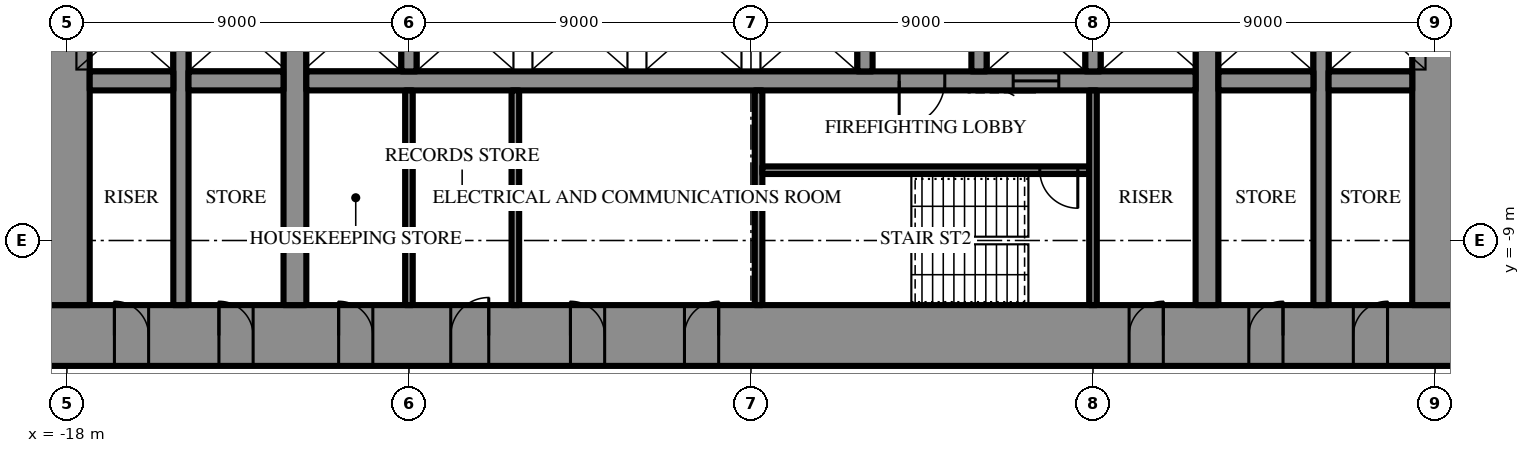
"""IFC4 building model, lengths in metres.
Left out: names, types, materials, properties, quantities, classifications, styles, units other than length and angle.
Written with IfcOpenShell. Run it as: python <this file> out.ifc"""

import sys

from ifc_helpers import new_model, si_unit, direction, frame, frame_2d, origin, place, context, subcontext, project, spatial, rectangle, extrude, element, fill, save


model = new_model("IFC4")
c1 = context("Model", 3, precision=1e-05, world=origin(), true_north=direction((0.0, 1.0)))
c2 = subcontext(c1, "Body", "Model", "MODEL_VIEW")
j1 = project(units=[si_unit("LENGTHUNIT", "METRE"), si_unit("PLANEANGLEUNIT", "RADIAN")], contexts=[c1])
p1 = place(None, origin())
s1 = spatial("IfcSite", under=j1, at=p1, CompositionType="ELEMENT")
p2 = place(p1, origin())
s2 = spatial("IfcBuilding", under=s1, at=p2, CompositionType="ELEMENT")
p3 = place(p2, frame((0.0, 0.0, 40.3)))
s3 = spatial("IfcBuildingStorey", under=s2, at=p3, CompositionType="ELEMENT", Elevation=40.3)
p4 = place(p3, frame((18.6, -11.5, 0.0), z_axis=(0.0, 0.0, 1.0), x_axis=(-1.0, 0.0, 0.0)))
e1 = element("IfcWall", 1, at=p4, inside=s3, PredefinedType="SHEAR", context=c2, shape_type="SweptSolid", body=[
    extrude(rectangle(XDim=37.2, YDim=1.6, at=frame_2d((18.6, 0.0))), origin(), (0.0, 0.0, 1.0), 4.2),
])
p5 = place(p4, frame((19.45, 0.0, 0.0)))
e2 = element("IfcOpeningElement", 2, at=p5, cuts=e1, PredefinedType="OPENING", context=c2, shape_type="SweptSolid", body=[
    extrude(rectangle(XDim=0.9, YDim=2.2, at=frame_2d((0.45, 1.1))), frame((0.0, 0.81, 0.0), z_axis=(0.0, -1.0, 0.0), x_axis=(1.0, 0.0, 0.0)), (0.0, 0.0, 1.0), 1.62),
])
p6 = place(p4, frame((22.45, 0.0, 0.0)))
e3 = element("IfcOpeningElement", 3, at=p6, cuts=e1, PredefinedType="OPENING", context=c2, shape_type="SweptSolid", body=[
    extrude(rectangle(XDim=0.9, YDim=2.2, at=frame_2d((0.45, 1.1))), frame((0.0, 0.81, 0.0), z_axis=(0.0, -1.0, 0.0), x_axis=(1.0, 0.0, 0.0)), (0.0, 0.0, 1.0), 1.62),
])
p7 = place(p4, frame((25.5, 0.0, 0.0)))
e4 = element("IfcOpeningElement", 4, at=p7, cuts=e1, PredefinedType="OPENING", context=c2, shape_type="SweptSolid", body=[
    extrude(rectangle(XDim=1.0, YDim=2.2, at=frame_2d((0.5, 1.1))), frame((0.0, 0.81, 0.0), z_axis=(0.0, -1.0, 0.0), x_axis=(1.0, 0.0, 0.0)), (0.0, 0.0, 1.0), 1.62),
])
p8 = place(p4, frame((1.85, 0.0, 0.0)))
e5 = element("IfcOpeningElement", 5, at=p8, cuts=e1, PredefinedType="OPENING", context=c2, shape_type="SweptSolid", body=[
    extrude(rectangle(XDim=0.9, YDim=2.2, at=frame_2d((0.45, 1.1))), frame((0.0, 0.81, 0.0), z_axis=(0.0, -1.0, 0.0), x_axis=(1.0, 0.0, 0.0)), (0.0, 0.0, 1.0), 1.62),
])
p9 = place(p4, frame((4.6, 0.0, 0.0)))
e6 = element("IfcOpeningElement", 6, at=p9, cuts=e1, PredefinedType="OPENING", context=c2, shape_type="SweptSolid", body=[
    extrude(rectangle(XDim=0.9, YDim=2.2, at=frame_2d((0.45, 1.1))), frame((0.0, 0.81, 0.0), z_axis=(0.0, -1.0, 0.0), x_axis=(1.0, 0.0, 0.0)), (0.0, 0.0, 1.0), 1.62),
])
p10 = place(p4, frame((7.75, 0.0, 0.0)))
e7 = element("IfcOpeningElement", 7, at=p10, cuts=e1, PredefinedType="OPENING", context=c2, shape_type="SweptSolid", body=[
    extrude(rectangle(XDim=0.9, YDim=2.2, at=frame_2d((0.45, 1.1))), frame((0.0, 0.81, 0.0), z_axis=(0.0, -1.0, 0.0), x_axis=(1.0, 0.0, 0.0)), (0.0, 0.0, 1.0), 1.62),
])
p11 = place(p4, frame((28.55, 0.0, 0.0)))
e8 = element("IfcOpeningElement", 8, at=p11, cuts=e1, PredefinedType="OPENING", context=c2, shape_type="SweptSolid", body=[
    extrude(rectangle(XDim=0.9, YDim=2.2, at=frame_2d((0.45, 1.1))), frame((0.0, 0.81, 0.0), z_axis=(0.0, -1.0, 0.0), x_axis=(1.0, 0.0, 0.0)), (0.0, 0.0, 1.0), 1.62),
])
p12 = place(p4, frame((31.7, 0.0, 0.0)))
e9 = element("IfcOpeningElement", 9, at=p12, cuts=e1, PredefinedType="OPENING", context=c2, shape_type="SweptSolid", body=[
    extrude(rectangle(XDim=0.9, YDim=2.2, at=frame_2d((0.45, 1.1))), frame((0.0, 0.81, 0.0), z_axis=(0.0, -1.0, 0.0), x_axis=(1.0, 0.0, 0.0)), (0.0, 0.0, 1.0), 1.62),
])
p13 = place(p4, frame((34.45, 0.0, 0.0)))
e10 = element("IfcOpeningElement", 10, at=p13, cuts=e1, PredefinedType="OPENING", context=c2, shape_type="SweptSolid", body=[
    extrude(rectangle(XDim=0.9, YDim=2.2, at=frame_2d((0.45, 1.1))), frame((0.0, 0.81, 0.0), z_axis=(0.0, -1.0, 0.0), x_axis=(1.0, 0.0, 0.0)), (0.0, 0.0, 1.0), 1.62),
])
p14 = place(p3, frame((18.0, -10.7, 0.0), z_axis=(0.0, 0.0, 1.0), x_axis=(0.0, 1.0, 0.0)))
e11 = element("IfcWall", 11, at=p14, inside=s3, PredefinedType="SHEAR", context=c2, shape_type="SweptSolid", body=[
    extrude(rectangle(XDim=21.4, YDim=1.2, at=frame_2d((10.7, 0.0))), origin(), (0.0, 0.0, 1.0), 4.2),
])
p15 = place(p14, frame((9.8, 0.0, 0.0)))
e12 = element("IfcOpeningElement", 12, at=p15, cuts=e11, PredefinedType="OPENING", context=c2, shape_type="SweptSolid", body=[
    extrude(rectangle(XDim=1.8, YDim=2.4, at=frame_2d((0.9, 1.2))), frame((0.0, 0.61, 0.0), z_axis=(0.0, -1.0, 0.0), x_axis=(1.0, 0.0, 0.0)), (0.0, 0.0, 1.0), 1.22),
])
p16 = place(p3, frame((-18.0, 10.7, 0.0), z_axis=(0.0, 0.0, 1.0), x_axis=(0.0, -1.0, 0.0)))
e13 = element("IfcWall", 13, at=p16, inside=s3, PredefinedType="SHEAR", context=c2, shape_type="SweptSolid", body=[
    extrude(rectangle(XDim=21.4, YDim=1.2, at=frame_2d((10.7, 0.0))), origin(), (0.0, 0.0, 1.0), 4.2),
])
p17 = place(p16, frame((9.8, 0.0, 0.0)))
e14 = element("IfcOpeningElement", 14, at=p17, cuts=e13, PredefinedType="OPENING", context=c2, shape_type="SweptSolid", body=[
    extrude(rectangle(XDim=1.8, YDim=2.4, at=frame_2d((0.9, 1.2))), frame((0.0, 0.61, 0.0), z_axis=(0.0, -1.0, 0.0), x_axis=(1.0, 0.0, 0.0)), (0.0, 0.0, 1.0), 1.22),
])
p18 = place(p3, frame((12.0, -10.7, 0.0), z_axis=(0.0, 0.0, 1.0), x_axis=(0.0, 1.0, 0.0)))
e15 = element("IfcWall", 15, at=p18, inside=s3, PredefinedType="SHEAR", context=c2, shape_type="SweptSolid", body=[
    extrude(rectangle(XDim=21.4, YDim=0.6, at=frame_2d((10.7, 0.0))), origin(), (0.0, 0.0, 1.0), 4.2),
])
p19 = place(p18, frame((9.8, 0.0, 0.0)))
e16 = element("IfcOpeningElement", 16, at=p19, cuts=e15, PredefinedType="OPENING", context=c2, shape_type="SweptSolid", body=[
    extrude(rectangle(XDim=1.8, YDim=2.4, at=frame_2d((0.9, 1.2))), frame((0.0, 0.31, 0.0), z_axis=(0.0, -1.0, 0.0), x_axis=(1.0, 0.0, 0.0)), (0.0, 0.0, 1.0), 0.62),
])
p20 = place(p3, frame((-12.0, -10.7, 0.0), z_axis=(0.0, 0.0, 1.0), x_axis=(0.0, 1.0, 0.0)))
e17 = element("IfcWall", 17, at=p20, inside=s3, PredefinedType="SHEAR", context=c2, shape_type="SweptSolid", body=[
    extrude(rectangle(XDim=21.4, YDim=0.6, at=frame_2d((10.7, 0.0))), origin(), (0.0, 0.0, 1.0), 4.2),
])
p21 = place(p20, frame((9.8, 0.0, 0.0)))
e18 = element("IfcOpeningElement", 18, at=p21, cuts=e17, PredefinedType="OPENING", context=c2, shape_type="SweptSolid", body=[
    extrude(rectangle(XDim=1.8, YDim=2.4, at=frame_2d((0.9, 1.2))), frame((0.0, 0.31, 0.0), z_axis=(0.0, -1.0, 0.0), x_axis=(1.0, 0.0, 0.0)), (0.0, 0.0, 1.0), 0.62),
])
p22 = place(p3, frame((15.0, -10.7, 0.0), z_axis=(0.0, 0.0, 1.0), x_axis=(0.0, 1.0, 0.0)))
e19 = element("IfcWall", 19, at=p22, inside=s3, PredefinedType="SHEAR", context=c2, shape_type="SweptSolid", body=[
    extrude(rectangle(XDim=21.4, YDim=0.4, at=frame_2d((10.7, 0.0))), origin(), (0.0, 0.0, 1.0), 4.2),
])
p23 = place(p22, frame((9.8, 0.0, 0.0)))
e20 = element("IfcOpeningElement", 20, at=p23, cuts=e19, PredefinedType="OPENING", context=c2, shape_type="SweptSolid", body=[
    extrude(rectangle(XDim=1.8, YDim=2.4, at=frame_2d((0.9, 1.2))), frame((0.0, 0.21, 0.0), z_axis=(0.0, -1.0, 0.0), x_axis=(1.0, 0.0, 0.0)), (0.0, 0.0, 1.0), 0.42),
])
p24 = place(p3, frame((-15.0, -10.7, 0.0), z_axis=(0.0, 0.0, 1.0), x_axis=(0.0, 1.0, 0.0)))
e21 = element("IfcWall", 21, at=p24, inside=s3, PredefinedType="SHEAR", context=c2, shape_type="SweptSolid", body=[
    extrude(rectangle(XDim=21.4, YDim=0.4, at=frame_2d((10.7, 0.0))), origin(), (0.0, 0.0, 1.0), 4.2),
])
p25 = place(p24, frame((9.8, 0.0, 0.0)))
e22 = element("IfcOpeningElement", 22, at=p25, cuts=e21, PredefinedType="OPENING", context=c2, shape_type="SweptSolid", body=[
    extrude(rectangle(XDim=1.8, YDim=2.4, at=frame_2d((0.9, 1.2))), frame((0.0, 0.21, 0.0), z_axis=(0.0, -1.0, 0.0), x_axis=(1.0, 0.0, 0.0)), (0.0, 0.0, 1.0), 0.42),
])
p26 = place(p3, frame((17.4, -4.8, 0.0), z_axis=(0.0, 0.0, 1.0), x_axis=(-1.0, 0.0, 0.0)))
e23 = element("IfcWall", 23, at=p26, inside=s3, PredefinedType="SHEAR", context=c2, shape_type="SweptSolid", body=[
    extrude(rectangle(XDim=2.2, YDim=0.5, at=frame_2d((1.1, 0.0))), origin(), (0.0, 0.0, 1.0), 4.2),
])
p27 = place(p3, frame((14.8, -4.8, 0.0), z_axis=(0.0, 0.0, 1.0), x_axis=(-1.0, 0.0, 0.0)))
e24 = element("IfcWall", 24, at=p27, inside=s3, PredefinedType="SHEAR", context=c2, shape_type="SweptSolid", body=[
    extrude(rectangle(XDim=2.5, YDim=0.5, at=frame_2d((1.25, 0.0))), origin(), (0.0, 0.0, 1.0), 4.2),
])
p28 = place(p3, frame((11.7, -4.8, 0.0), z_axis=(0.0, 0.0, 1.0), x_axis=(-1.0, 0.0, 0.0)))
e25 = element("IfcWall", 25, at=p28, inside=s3, PredefinedType="SHEAR", context=c2, shape_type="SweptSolid", body=[
    extrude(rectangle(XDim=23.4, YDim=0.5, at=frame_2d((11.7, 0.0))), origin(), (0.0, 0.0, 1.0), 4.2),
])
p29 = place(p28, frame((6.6, 0.0, 0.0)))
e26 = element("IfcOpeningElement", 26, at=p29, cuts=e25, PredefinedType="OPENING", context=c2, shape_type="SweptSolid", body=[
    extrude(rectangle(XDim=1.2, YDim=2.2, at=frame_2d((0.6, 1.1))), frame((0.0, 0.26, 0.0), z_axis=(0.0, -1.0, 0.0), x_axis=(1.0, 0.0, 0.0)), (0.0, 0.0, 1.0), 0.52),
])
p30 = place(p28, frame((3.6, 0.0, 0.0)))
e27 = element("IfcOpeningElement", 27, at=p30, cuts=e25, PredefinedType="OPENING", context=c2, shape_type="SweptSolid", body=[
    extrude(rectangle(XDim=1.2, YDim=2.2, at=frame_2d((0.6, 1.1))), frame((0.0, 0.26, 0.0), z_axis=(0.0, -1.0, 0.0), x_axis=(1.0, 0.0, 0.0)), (0.0, 0.0, 1.0), 0.52),
])
p31 = place(p3, frame((-12.3, -4.8, 0.0), z_axis=(0.0, 0.0, 1.0), x_axis=(-1.0, 0.0, 0.0)))
e28 = element("IfcWall", 28, at=p31, inside=s3, PredefinedType="SHEAR", context=c2, shape_type="SweptSolid", body=[
    extrude(rectangle(XDim=2.5, YDim=0.5, at=frame_2d((1.25, 0.0))), origin(), (0.0, 0.0, 1.0), 4.2),
])
p32 = place(p3, frame((-15.2, -4.8, 0.0), z_axis=(0.0, 0.0, 1.0), x_axis=(-1.0, 0.0, 0.0)))
e29 = element("IfcWall", 29, at=p32, inside=s3, PredefinedType="SHEAR", context=c2, shape_type="SweptSolid", body=[
    extrude(rectangle(XDim=2.2, YDim=0.5, at=frame_2d((1.1, 0.0))), origin(), (0.0, 0.0, 1.0), 4.2),
])
for number, where, z_axis, x_axis in (
    (30, (9.0, -2.25, 0.0), (0.0, 0.0, 1.0), (0.0, -1.0, 0.0)),
    (31, (6.0, -2.25, 0.0), (0.0, 0.0, 1.0), (0.0, -1.0, 0.0)),
    (32, (3.0, -2.25, 0.0), (0.0, 0.0, 1.0), (0.0, -1.0, 0.0)),
    (33, (-9.0, -2.25, 0.0), (0.0, 0.0, 1.0), (0.0, -1.0, 0.0)),
):
    element("IfcWall", number, at=place(p3, frame(where, z_axis=z_axis, x_axis=x_axis)), inside=s3, PredefinedType="SHEAR", context=c2, shape_type="SweptSolid", body=[
        extrude(rectangle(XDim=2.3, YDim=0.4, at=frame_2d((1.15, 0.0))), origin(), (0.0, 0.0, 1.0), 4.2),
    ])
p33 = place(p3, frame((0.2, -5.05, 0.0), z_axis=(0.0, 0.0, 1.0), x_axis=(0.0, -1.0, 0.0)))
e34 = element("IfcWall", 34, at=p33, inside=s3, PredefinedType="SHEAR", context=c2, shape_type="SweptSolid", body=[
    extrude(rectangle(XDim=5.65, YDim=0.2, at=frame_2d((2.825, 0.0))), origin(), (0.0, 0.0, 1.0), 4.2),
])
p34 = place(p3, frame((8.9, -7.15, 0.0), z_axis=(0.0, 0.0, 1.0), x_axis=(-1.0, 0.0, 0.0)))
e35 = element("IfcWall", 35, at=p34, inside=s3, PredefinedType="SHEAR", context=c2, shape_type="SweptSolid", body=[
    extrude(rectangle(XDim=8.6, YDim=0.2, at=frame_2d((4.3, 0.0))), origin(), (0.0, 0.0, 1.0), 4.2),
])
p35 = place(p34, frame((0.3, 0.0, 0.0)))
e36 = element("IfcOpeningElement", 36, at=p35, cuts=e35, PredefinedType="OPENING", context=c2, shape_type="SweptSolid", body=[
    extrude(rectangle(XDim=1.0, YDim=2.2, at=frame_2d((0.5, 1.1))), frame((0.0, 0.11, 0.0), z_axis=(0.0, -1.0, 0.0), x_axis=(1.0, 0.0, 0.0)), (0.0, 0.0, 1.0), 0.22),
])
for number, where, z_axis, x_axis in (
    (37, (9.0, -5.05, 0.0), (0.0, 0.0, 1.0), (0.0, -1.0, 0.0)),
    (38, (-9.0, -5.05, 0.0), (0.0, 0.0, 1.0), (0.0, -1.0, 0.0)),
    (39, (-6.2, -5.05, 0.0), (0.0, 0.0, 1.0), (0.0, -1.0, 0.0)),
):
    element("IfcWall", number, at=place(p3, frame(where, z_axis=z_axis, x_axis=x_axis)), inside=s3, PredefinedType="PARTITIONING", context=c2, shape_type="SweptSolid", body=[
        extrude(rectangle(XDim=5.65, YDim=0.2, at=frame_2d((2.825, 0.0))), origin(), (0.0, 0.0, 1.0), 4.0),
    ])
p36 = place(p29, origin())
e40 = element("IfcDoor", 40, at=p36, inside=s3, OperationType="SINGLE_SWING_LEFT", PredefinedType="DOOR", context=c2, shape_type="SweptSolid", body=[
    extrude(rectangle(XDim=1.2, YDim=2.2, at=frame_2d((0.6, 1.1))), frame((0.0, 0.025, 0.0), z_axis=(0.0, -1.0, 0.0), x_axis=(1.0, 0.0, 0.0)), (0.0, 0.0, 1.0), 0.05),
])
fill(e26, e40)
p37 = place(p35, origin())
e41 = element("IfcDoor", 41, at=p37, inside=s3, OperationType="SINGLE_SWING_RIGHT", PredefinedType="DOOR", context=c2, shape_type="SweptSolid", body=[
    extrude(rectangle(XDim=1.0, YDim=2.2, at=frame_2d((0.5, 1.1))), frame((0.0, 0.025, 0.0), z_axis=(0.0, -1.0, 0.0), x_axis=(1.0, 0.0, 0.0)), (0.0, 0.0, 1.0), 0.05),
])
fill(e36, e41)
p38 = place(p5, frame((0.9, 0.0, 0.0), z_axis=(0.0, 0.0, 1.0), x_axis=(-1.0, 0.0, 0.0)))
e42 = element("IfcDoor", 42, at=p38, inside=s3, OperationType="SINGLE_SWING_LEFT", PredefinedType="DOOR", context=c2, shape_type="SweptSolid", body=[
    extrude(rectangle(XDim=0.9, YDim=2.2, at=frame_2d((0.45, 1.1))), frame((0.0, 0.025, 0.0), z_axis=(0.0, -1.0, 0.0), x_axis=(1.0, 0.0, 0.0)), (0.0, 0.0, 1.0), 0.05),
])
fill(e2, e42)
p39 = place(p6, frame((0.9, 0.0, 0.0), z_axis=(0.0, 0.0, 1.0), x_axis=(-1.0, 0.0, 0.0)))
e43 = element("IfcDoor", 43, at=p39, inside=s3, OperationType="SINGLE_SWING_RIGHT", PredefinedType="DOOR", context=c2, shape_type="SweptSolid", body=[
    extrude(rectangle(XDim=0.9, YDim=2.2, at=frame_2d((0.45, 1.1))), frame((0.0, 0.025, 0.0), z_axis=(0.0, -1.0, 0.0), x_axis=(1.0, 0.0, 0.0)), (0.0, 0.0, 1.0), 0.05),
])
fill(e3, e43)
p40 = place(p7, frame((1.0, 0.0, 0.0), z_axis=(0.0, 0.0, 1.0), x_axis=(-1.0, 0.0, 0.0)))
e44 = element("IfcDoor", 44, at=p40, inside=s3, OperationType="SINGLE_SWING_LEFT", PredefinedType="DOOR", context=c2, shape_type="SweptSolid", body=[
    extrude(rectangle(XDim=1.0, YDim=2.2, at=frame_2d((0.5, 1.1))), frame((0.0, 0.025, 0.0), z_axis=(0.0, -1.0, 0.0), x_axis=(1.0, 0.0, 0.0)), (0.0, 0.0, 1.0), 0.05),
])
fill(e4, e44)
p41 = place(p8, frame((0.9, 0.0, 0.0), z_axis=(0.0, 0.0, 1.0), x_axis=(-1.0, 0.0, 0.0)))
e45 = element("IfcDoor", 45, at=p41, inside=s3, OperationType="SINGLE_SWING_LEFT", PredefinedType="DOOR", context=c2, shape_type="SweptSolid", body=[
    extrude(rectangle(XDim=0.9, YDim=2.2, at=frame_2d((0.45, 1.1))), frame((0.0, 0.025, 0.0), z_axis=(0.0, -1.0, 0.0), x_axis=(1.0, 0.0, 0.0)), (0.0, 0.0, 1.0), 0.05),
])
fill(e5, e45)
p42 = place(p9, frame((0.9, 0.0, 0.0), z_axis=(0.0, 0.0, 1.0), x_axis=(-1.0, 0.0, 0.0)))
e46 = element("IfcDoor", 46, at=p42, inside=s3, OperationType="SINGLE_SWING_LEFT", PredefinedType="DOOR", context=c2, shape_type="SweptSolid", body=[
    extrude(rectangle(XDim=0.9, YDim=2.2, at=frame_2d((0.45, 1.1))), frame((0.0, 0.025, 0.0), z_axis=(0.0, -1.0, 0.0), x_axis=(1.0, 0.0, 0.0)), (0.0, 0.0, 1.0), 0.05),
])
fill(e6, e46)
p43 = place(p10, frame((0.9, 0.0, 0.0), z_axis=(0.0, 0.0, 1.0), x_axis=(-1.0, 0.0, 0.0)))
e47 = element("IfcDoor", 47, at=p43, inside=s3, OperationType="SINGLE_SWING_LEFT", PredefinedType="DOOR", context=c2, shape_type="SweptSolid", body=[
    extrude(rectangle(XDim=0.9, YDim=2.2, at=frame_2d((0.45, 1.1))), frame((0.0, 0.025, 0.0), z_axis=(0.0, -1.0, 0.0), x_axis=(1.0, 0.0, 0.0)), (0.0, 0.0, 1.0), 0.05),
])
fill(e7, e47)
p44 = place(p11, frame((0.9, 0.0, 0.0), z_axis=(0.0, 0.0, 1.0), x_axis=(-1.0, 0.0, 0.0)))
e48 = element("IfcDoor", 48, at=p44, inside=s3, OperationType="SINGLE_SWING_RIGHT", PredefinedType="DOOR", context=c2, shape_type="SweptSolid", body=[
    extrude(rectangle(XDim=0.9, YDim=2.2, at=frame_2d((0.45, 1.1))), frame((0.0, 0.025, 0.0), z_axis=(0.0, -1.0, 0.0), x_axis=(1.0, 0.0, 0.0)), (0.0, 0.0, 1.0), 0.05),
])
fill(e8, e48)
p45 = place(p12, frame((0.9, 0.0, 0.0), z_axis=(0.0, 0.0, 1.0), x_axis=(-1.0, 0.0, 0.0)))
e49 = element("IfcDoor", 49, at=p45, inside=s3, OperationType="SINGLE_SWING_RIGHT", PredefinedType="DOOR", context=c2, shape_type="SweptSolid", body=[
    extrude(rectangle(XDim=0.9, YDim=2.2, at=frame_2d((0.45, 1.1))), frame((0.0, 0.025, 0.0), z_axis=(0.0, -1.0, 0.0), x_axis=(1.0, 0.0, 0.0)), (0.0, 0.0, 1.0), 0.05),
])
fill(e9, e49)
p46 = place(p13, frame((0.9, 0.0, 0.0), z_axis=(0.0, 0.0, 1.0), x_axis=(-1.0, 0.0, 0.0)))
e50 = element("IfcDoor", 50, at=p46, inside=s3, OperationType="SINGLE_SWING_RIGHT", PredefinedType="DOOR", context=c2, shape_type="SweptSolid", body=[
    extrude(rectangle(XDim=0.9, YDim=2.2, at=frame_2d((0.45, 1.1))), frame((0.0, 0.025, 0.0), z_axis=(0.0, -1.0, 0.0), x_axis=(1.0, 0.0, 0.0)), (0.0, 0.0, 1.0), 0.05),
])
fill(e10, e50)
p47 = place(p30, origin())
e51 = element("IfcDoor", 51, at=p47, inside=s3, OperationType="SLIDING_TO_LEFT", PredefinedType="DOOR", context=c2, shape_type="SweptSolid", body=[
    extrude(rectangle(XDim=1.2, YDim=2.2, at=frame_2d((0.6, 1.1))), frame((0.0, 0.025, 0.0), z_axis=(0.0, -1.0, 0.0), x_axis=(1.0, 0.0, 0.0)), (0.0, 0.0, 1.0), 0.05),
])
fill(e27, e51)
save(model, sys.argv[1])
